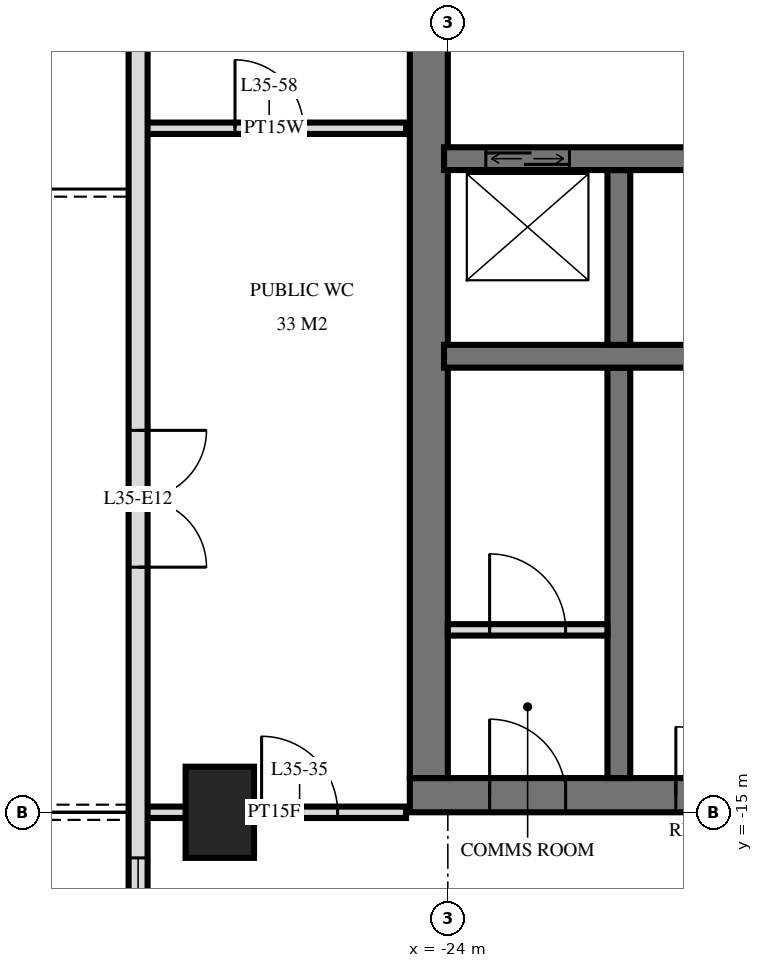
"""IFC4 building model, lengths in metres.
Left out: names, types, materials, properties, quantities, classifications, styles, units other than length and angle.
Written with IfcOpenShell. Run it as: python <this file> out.ifc"""

import sys

from ifc_helpers import new_model, si_unit, direction, frame, frame_2d, origin, origin_2d, place, context, subcontext, project, spatial, rectangle, extrude, element, fill, save


model = new_model("IFC4")
c1 = context("Model", 3, precision=1e-05, world=origin(), true_north=direction((0.0, 1.0)))
c2 = subcontext(c1, "Body", "Model", "MODEL_VIEW")
j1 = project(units=[si_unit("LENGTHUNIT", "METRE"), si_unit("PLANEANGLEUNIT", "RADIAN")], contexts=[c1])
p1 = place(None, origin())
s1 = spatial("IfcSite", under=j1, at=p1, CompositionType="ELEMENT")
p2 = place(p1, origin())
s2 = spatial("IfcBuilding", under=s1, at=p2, CompositionType="ELEMENT")
p3 = place(p2, frame((0.0, 0.0, 138.0)))
s3 = spatial("IfcBuildingStorey", under=s2, at=p3, CompositionType="ELEMENT", Elevation=138.0)
p4 = place(p3, frame((-27.0, -15.0, 0.0), z_axis=(0.0, 0.0, 1.0), x_axis=(0.0, 1.0, 0.0)))
e1 = element("IfcColumn", 1, at=p4, inside=s3, PredefinedType="COLUMN", context=c2, shape_type="SweptSolid", body=[
    extrude(rectangle(XDim=1.2, YDim=0.9, at=origin_2d()), origin(), (0.0, 0.0, 1.0), 3.6),
])
p5 = place(p3, frame((-24.5, -14.775, 0.0), z_axis=(0.0, 0.0, 1.0), x_axis=(1.0, 0.0, 0.0)))
e2 = element("IfcWall", 2, at=p5, inside=s3, PredefinedType="SHEAR", context=c2, shape_type="SweptSolid", body=[
    extrude(rectangle(XDim=14.5, YDim=0.45, at=frame_2d((7.25, 0.0))), origin(), (0.0, 0.0, 1.0), 3.6),
])
p6 = place(p5, frame((6.2, 0.0, 0.0)))
e3 = element("IfcOpeningElement", 3, at=p6, cuts=e2, PredefinedType="OPENING", context=c2, shape_type="SweptSolid", body=[
    extrude(rectangle(XDim=1.2, YDim=2.1, at=frame_2d((0.6, 1.05))), frame((0.0, 0.235, 0.0), z_axis=(0.0, -1.0, 0.0), x_axis=(1.0, 0.0, 0.0)), (0.0, 0.0, 1.0), 0.47),
])
p7 = place(p5, frame((9.25, 0.0, 0.0)))
e4 = element("IfcOpeningElement", 4, at=p7, cuts=e2, PredefinedType="OPENING", context=c2, shape_type="SweptSolid", body=[
    extrude(rectangle(XDim=1.1, YDim=2.1, at=frame_2d((0.55, 1.05))), frame((0.0, 0.235, 0.0), z_axis=(0.0, -1.0, 0.0), x_axis=(1.0, 0.0, 0.0)), (0.0, 0.0, 1.0), 0.47),
])
p8 = place(p5, frame((3.5, 0.0, 0.0)))
e5 = element("IfcOpeningElement", 5, at=p8, cuts=e2, PredefinedType="OPENING", context=c2, shape_type="SweptSolid", body=[
    extrude(rectangle(XDim=0.9, YDim=2.1, at=frame_2d((0.45, 1.05))), frame((0.0, 0.235, 0.0), z_axis=(0.0, -1.0, 0.0), x_axis=(1.0, 0.0, 0.0)), (0.0, 0.0, 1.0), 0.47),
])
p9 = place(p5, frame((1.05, 0.0, 0.0)))
e6 = element("IfcOpeningElement", 6, at=p9, cuts=e2, PredefinedType="OPENING", context=c2, shape_type="SweptSolid", body=[
    extrude(rectangle(XDim=1.0, YDim=2.1, at=frame_2d((0.5, 1.05))), frame((0.0, 0.235, 0.0), z_axis=(0.0, -1.0, 0.0), x_axis=(1.0, 0.0, 0.0)), (0.0, 0.0, 1.0), 0.47),
])
p10 = place(p3, frame((-24.25, -14.55, 0.0), z_axis=(0.0, 0.0, 1.0), x_axis=(0.0, 1.0, 0.0)))
e7 = element("IfcWall", 7, at=p10, inside=s3, PredefinedType="SHEAR", context=c2, shape_type="SweptSolid", body=[
    extrude(rectangle(XDim=14.1, YDim=0.5, at=frame_2d((7.05, 0.0))), origin(), (0.0, 0.0, 1.0), 3.6),
])
p11 = place(p3, frame((-24.05, -6.4, 0.0), z_axis=(0.0, 0.0, 1.0), x_axis=(1.0, 0.0, 0.0)))
e8 = element("IfcWall", 8, at=p11, inside=s3, PredefinedType="SHEAR", context=c2, shape_type="SweptSolid", body=[
    extrude(rectangle(XDim=13.7, YDim=0.3, at=frame_2d((6.85, 0.0))), origin(), (0.0, 0.0, 1.0), 3.6),
])
p12 = place(p11, frame((0.55, 0.0, 0.0)))
e9 = element("IfcOpeningElement", 9, at=p12, cuts=e8, PredefinedType="OPENING", context=c2, shape_type="SweptSolid", body=[
    extrude(rectangle(XDim=1.1, YDim=2.1, at=frame_2d((0.55, 1.05))), frame((0.0, 0.16, 0.0), z_axis=(0.0, -1.0, 0.0), x_axis=(1.0, 0.0, 0.0)), (0.0, 0.0, 1.0), 0.32),
])
p13 = place(p11, frame((5.8, 0.0, 0.0)))
e10 = element("IfcOpeningElement", 10, at=p13, cuts=e8, PredefinedType="OPENING", context=c2, shape_type="SweptSolid", body=[
    extrude(rectangle(XDim=1.1, YDim=2.1, at=frame_2d((0.55, 1.05))), frame((0.0, 0.16, 0.0), z_axis=(0.0, -1.0, 0.0), x_axis=(1.0, 0.0, 0.0)), (0.0, 0.0, 1.0), 0.32),
])
p14 = place(p3, frame((-24.05, -9.0, 0.0), z_axis=(0.0, 0.0, 1.0), x_axis=(1.0, 0.0, 0.0)))
e11 = element("IfcWall", 11, at=p14, inside=s3, PredefinedType="SHEAR", context=c2, shape_type="SweptSolid", body=[
    extrude(rectangle(XDim=13.7, YDim=0.3, at=frame_2d((6.85, 0.0))), origin(), (0.0, 0.0, 1.0), 3.6),
])
p15 = place(p14, frame((8.8, 0.0, 0.0)))
e12 = element("IfcOpeningElement", 12, at=p15, cuts=e11, PredefinedType="OPENING", context=c2, shape_type="SweptSolid", body=[
    extrude(rectangle(XDim=1.1, YDim=2.1, at=frame_2d((0.55, 1.05))), frame((0.0, 0.16, 0.0), z_axis=(0.0, -1.0, 0.0), x_axis=(1.0, 0.0, 0.0)), (0.0, 0.0, 1.0), 0.32),
])
p16 = place(p3, frame((-21.75, -8.85, 0.0), z_axis=(0.0, 0.0, 1.0), x_axis=(0.0, 1.0, 0.0)))
e13 = element("IfcWall", 13, at=p16, inside=s3, PredefinedType="SHEAR", context=c2, shape_type="SweptSolid", body=[
    extrude(rectangle(XDim=2.3, YDim=0.3, at=frame_2d((1.15, 0.0))), origin(), (0.0, 0.0, 1.0), 3.6),
])
p17 = place(p3, frame((-21.75, -14.55, 0.0), z_axis=(0.0, 0.0, 1.0), x_axis=(0.0, 1.0, 0.0)))
e14 = element("IfcWall", 14, at=p17, inside=s3, PredefinedType="SHEAR", context=c2, shape_type="SweptSolid", body=[
    extrude(rectangle(XDim=5.4, YDim=0.3, at=frame_2d((2.7, 0.0))), origin(), (0.0, 0.0, 1.0), 3.6),
])
p18 = place(p3, frame((-28.075, -3.325, 0.0), z_axis=(0.0, 0.0, 1.0), x_axis=(0.0, -1.0, 0.0)))
e15 = element("IfcWall", 15, at=p18, inside=s3, PredefinedType="SOLIDWALL", context=c2, shape_type="SweptSolid", body=[
    extrude(rectangle(XDim=25.951, YDim=0.25, at=frame_2d((12.975, 0.0))), origin(), (0.0, 0.0, 1.0), 3.32),
])
p19 = place(p18, frame((6.65, 0.0, 0.0)))
e16 = element("IfcOpeningElement", 16, at=p19, cuts=e15, PredefinedType="OPENING", context=c2, shape_type="SweptSolid", body=[
    extrude(rectangle(XDim=1.8, YDim=2.4, at=frame_2d((0.9, 1.2))), frame((0.0, 0.135, 0.0), z_axis=(0.0, -1.0, 0.0), x_axis=(1.0, 0.0, 0.0)), (0.0, 0.0, 1.0), 0.27),
])
p20 = place(p18, frame((12.275, 0.0, 0.3)))
e17 = element("IfcOpeningElement", 17, at=p20, cuts=e15, PredefinedType="OPENING", context=c2, shape_type="SweptSolid", body=[
    extrude(rectangle(XDim=1.2, YDim=2.1, at=frame_2d((0.6, 1.05))), frame((0.0, 0.135, 0.0), z_axis=(0.0, -1.0, 0.0), x_axis=(1.0, 0.0, 0.0)), (0.0, 0.0, 1.0), 0.27),
])
p21 = place(p18, frame((15.575, 0.0, 0.3)))
e18 = element("IfcOpeningElement", 18, at=p21, cuts=e15, PredefinedType="OPENING", context=c2, shape_type="SweptSolid", body=[
    extrude(rectangle(XDim=1.2, YDim=2.1, at=frame_2d((0.6, 1.05))), frame((0.0, 0.135, 0.0), z_axis=(0.0, -1.0, 0.0), x_axis=(1.0, 0.0, 0.0)), (0.0, 0.0, 1.0), 0.27),
])
p22 = place(p18, frame((18.175, 0.0, 0.0)))
e19 = element("IfcOpeningElement", 19, at=p22, cuts=e15, PredefinedType="OPENING", context=c2, shape_type="SweptSolid", body=[
    extrude(rectangle(XDim=1.8, YDim=2.4, at=frame_2d((0.9, 1.2))), frame((0.0, 0.135, 0.0), z_axis=(0.0, -1.0, 0.0), x_axis=(1.0, 0.0, 0.0)), (0.0, 0.0, 1.0), 0.27),
])
p23 = place(p18, frame((21.075, 0.0, 0.0)))
e20 = element("IfcOpeningElement", 20, at=p23, cuts=e15, PredefinedType="OPENING", context=c2, shape_type="SweptSolid", body=[
    extrude(rectangle(XDim=1.8, YDim=2.4, at=frame_2d((0.9, 1.2))), frame((0.0, 0.135, 0.0), z_axis=(0.0, -1.0, 0.0), x_axis=(1.0, 0.0, 0.0)), (0.0, 0.0, 1.0), 0.27),
])
p24 = place(p18, frame((23.825, 0.0, 0.3)))
e21 = element("IfcOpeningElement", 21, at=p24, cuts=e15, PredefinedType="OPENING", context=c2, shape_type="SweptSolid", body=[
    extrude(rectangle(XDim=1.8, YDim=2.1, at=frame_2d((0.9, 1.05))), frame((0.0, 0.135, 0.0), z_axis=(0.0, -1.0, 0.0), x_axis=(1.0, 0.0, 0.0)), (0.0, 0.0, 1.0), 0.27),
])
p25 = place(p3, frame((-24.0, -12.6, 0.0), z_axis=(0.0, 0.0, 1.0), x_axis=(1.0, 0.0, 0.0)))
e22 = element("IfcWall", 22, at=p25, inside=s3, PredefinedType="PARTITIONING", context=c2, shape_type="SweptSolid", body=[
    extrude(rectangle(XDim=2.1, YDim=0.15, at=frame_2d((1.05, 0.0))), origin(), (0.0, 0.0, 1.0), 3.3),
])
p26 = place(p25, frame((0.55, 0.0, 0.0)))
e23 = element("IfcOpeningElement", 23, at=p26, cuts=e22, PredefinedType="OPENING", context=c2, shape_type="SweptSolid", body=[
    extrude(rectangle(XDim=1.0, YDim=2.1, at=frame_2d((0.5, 1.05))), frame((0.0, 0.085, 0.0), z_axis=(0.0, -1.0, 0.0), x_axis=(1.0, 0.0, 0.0)), (0.0, 0.0, 1.0), 0.17),
])
p27 = place(p3, frame((-28.02, -15.0, 0.0), z_axis=(0.0, 0.0, 1.0), x_axis=(1.0, 0.0, 0.0)))
e24 = element("IfcWall", 24, at=p27, inside=s3, PredefinedType="PARTITIONING", context=c2, shape_type="SweptSolid", body=[
    extrude(rectangle(XDim=3.47, YDim=0.15, at=frame_2d((1.735, 0.0))), origin(), (0.0, 0.0, 1.0), 3.32),
])
p28 = place(p27, frame((1.57, 0.0, 0.0)))
e25 = element("IfcOpeningElement", 25, at=p28, cuts=e24, PredefinedType="OPENING", context=c2, shape_type="SweptSolid", body=[
    extrude(rectangle(XDim=1.0, YDim=2.1, at=frame_2d((0.5, 1.05))), frame((0.0, 0.085, 0.0), z_axis=(0.0, -1.0, 0.0), x_axis=(1.0, 0.0, 0.0)), (0.0, 0.0, 1.0), 0.17),
])
p29 = place(p3, frame((-28.02, -6.0, 0.0), z_axis=(0.0, 0.0, 1.0), x_axis=(1.0, 0.0, 0.0)))
e26 = element("IfcWall", 26, at=p29, inside=s3, PredefinedType="PLUMBINGWALL", context=c2, shape_type="SweptSolid", body=[
    extrude(rectangle(XDim=3.47, YDim=0.15, at=frame_2d((1.735, 0.0))), origin(), (0.0, 0.0, 1.0), 3.32),
])
p30 = place(p29, frame((1.22, 0.0, 0.0)))
e27 = element("IfcOpeningElement", 27, at=p30, cuts=e26, PredefinedType="OPENING", context=c2, shape_type="SweptSolid", body=[
    extrude(rectangle(XDim=0.9, YDim=2.1, at=frame_2d((0.45, 1.05))), frame((0.0, 0.085, 0.0), z_axis=(0.0, -1.0, 0.0), x_axis=(1.0, 0.0, 0.0)), (0.0, 0.0, 1.0), 0.17),
])
p31 = place(p19, origin())
e28 = element("IfcDoor", 28, at=p31, inside=s3, OperationType="DOUBLE_DOOR_SINGLE_SWING", PredefinedType="DOOR", context=c2, shape_type="SweptSolid", body=[
    extrude(rectangle(XDim=1.8, YDim=2.4, at=frame_2d((0.9, 1.2))), frame((0.0, 0.025, 0.0), z_axis=(0.0, -1.0, 0.0), x_axis=(1.0, 0.0, 0.0)), (0.0, 0.0, 1.0), 0.05),
])
fill(e16, e28)
p32 = place(p20, origin())
e29 = element("IfcWindow", 29, at=p32, inside=s3, PartitioningType="SINGLE_PANEL", PredefinedType="WINDOW", context=c2, shape_type="SweptSolid", body=[
    extrude(rectangle(XDim=1.2, YDim=2.1, at=frame_2d((0.6, 1.05))), frame((0.0, 0.03, 0.0), z_axis=(0.0, -1.0, 0.0), x_axis=(1.0, 0.0, 0.0)), (0.0, 0.0, 1.0), 0.06),
])
fill(e17, e29)
p33 = place(p12, origin())
e30 = element("IfcDoor", 30, at=p33, inside=s3, OperationType="DOUBLE_DOOR_SLIDING", PredefinedType="USERDEFINED", context=c2, shape_type="SweptSolid", body=[
    extrude(rectangle(XDim=1.1, YDim=2.1, at=frame_2d((0.55, 1.05))), frame((0.0, 0.025, 0.0), z_axis=(0.0, -1.0, 0.0), x_axis=(1.0, 0.0, 0.0)), (0.0, 0.0, 1.0), 0.05),
])
fill(e9, e30)
p34 = place(p8, origin())
e31 = element("IfcDoor", 31, at=p34, inside=s3, OperationType="SINGLE_SWING_RIGHT", PredefinedType="DOOR", context=c2, shape_type="SweptSolid", body=[
    extrude(rectangle(XDim=0.9, YDim=2.1, at=frame_2d((0.45, 1.05))), frame((0.0, 0.025, 0.0), z_axis=(0.0, -1.0, 0.0), x_axis=(1.0, 0.0, 0.0)), (0.0, 0.0, 1.0), 0.05),
])
fill(e5, e31)
p35 = place(p9, origin())
e32 = element("IfcDoor", 32, at=p35, inside=s3, OperationType="SINGLE_SWING_RIGHT", PredefinedType="DOOR", context=c2, shape_type="SweptSolid", body=[
    extrude(rectangle(XDim=1.0, YDim=2.1, at=frame_2d((0.5, 1.05))), frame((0.0, 0.025, 0.0), z_axis=(0.0, -1.0, 0.0), x_axis=(1.0, 0.0, 0.0)), (0.0, 0.0, 1.0), 0.05),
])
fill(e6, e32)
p36 = place(p26, origin())
e33 = element("IfcDoor", 33, at=p36, inside=s3, OperationType="SINGLE_SWING_RIGHT", PredefinedType="DOOR", context=c2, shape_type="SweptSolid", body=[
    extrude(rectangle(XDim=1.0, YDim=2.1, at=frame_2d((0.5, 1.05))), frame((0.0, 0.025, 0.0), z_axis=(0.0, -1.0, 0.0), x_axis=(1.0, 0.0, 0.0)), (0.0, 0.0, 1.0), 0.05),
])
fill(e23, e33)
p37 = place(p28, origin())
e34 = element("IfcDoor", 34, at=p37, inside=s3, OperationType="SINGLE_SWING_RIGHT", PredefinedType="DOOR", context=c2, shape_type="SweptSolid", body=[
    extrude(rectangle(XDim=1.0, YDim=2.1, at=frame_2d((0.5, 1.05))), frame((0.0, 0.025, 0.0), z_axis=(0.0, -1.0, 0.0), x_axis=(1.0, 0.0, 0.0)), (0.0, 0.0, 1.0), 0.05),
])
fill(e25, e34)
p38 = place(p30, origin())
e35 = element("IfcDoor", 35, at=p38, inside=s3, OperationType="SINGLE_SWING_RIGHT", PredefinedType="DOOR", context=c2, shape_type="SweptSolid", body=[
    extrude(rectangle(XDim=0.9, YDim=2.1, at=frame_2d((0.45, 1.05))), frame((0.0, 0.025, 0.0), z_axis=(0.0, -1.0, 0.0), x_axis=(1.0, 0.0, 0.0)), (0.0, 0.0, 1.0), 0.05),
])
fill(e27, e35)
save(model, sys.argv[1])
